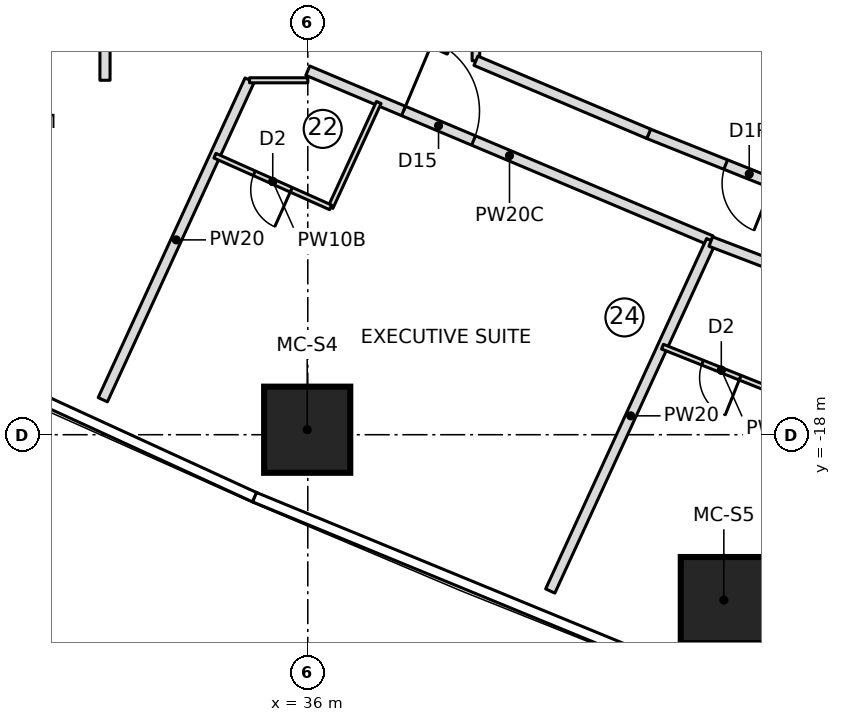
"""IFC4 building model, lengths in metres.
Left out: names, types, materials, properties, quantities, classifications, styles, units other than length and angle.
Written with IfcOpenShell. Run it as: python <this file> out.ifc"""

import sys

from ifc_helpers import new_model, si_unit, direction, frame, frame_2d, origin, origin_2d, place, context, subcontext, project, spatial, rectangle, extrude, element, fill, save


model = new_model("IFC4")
c1 = context("Model", 3, precision=1e-05, world=origin(), true_north=direction((0.0, 1.0)))
c2 = subcontext(c1, "Body", "Model", "MODEL_VIEW")
j1 = project(units=[si_unit("LENGTHUNIT", "METRE"), si_unit("PLANEANGLEUNIT", "RADIAN")], contexts=[c1])
p1 = place(None, origin())
s1 = spatial("IfcSite", under=j1, at=p1, CompositionType="ELEMENT")
p2 = place(p1, origin())
s2 = spatial("IfcBuilding", under=s1, at=p2, CompositionType="ELEMENT")
p3 = place(p2, frame((0.0, 0.0, 92.0)))
s3 = spatial("IfcBuildingStorey", under=s2, at=p3, CompositionType="ELEMENT", Elevation=92.0)
for number, where, z_axis, x_axis in (
    (1, (35.988, -17.902, 0.0), (0.0, 0.0, 1.0), (1.0, 0.0, 0.0)),
    (2, (44.211, -21.264, 0.0), (0.0, 0.0, 1.0), (1.0, 0.0, 0.0)),
):
    element("IfcColumn", number, at=place(p3, frame(where, z_axis=z_axis, x_axis=x_axis)), inside=s3, PredefinedType="COLUMN", context=c2, shape_type="SweptSolid", body=[
        extrude(rectangle(XDim=1.7, YDim=1.7, at=origin_2d()), origin(), (0.0, 0.0, 1.0), 3.55),
    ])
p4 = place(p3, frame((31.955, -17.309, 0.0), z_axis=(0.0, 0.0, 1.0), x_axis=(0.417418561443, 0.908714336061, 0.0)))
e3 = element("IfcWall", 3, at=p4, inside=s3, PredefinedType="PARTITIONING", context=c2, shape_type="SweptSolid", body=[
    extrude(rectangle(XDim=6.943, YDim=0.2, at=frame_2d((3.472, 0.0))), origin(), (0.0, 0.0, 1.0), 3.25),
])
p5 = place(p3, frame((36.0, -10.815, 0.0), z_axis=(0.0, 0.0, 1.0), x_axis=(0.921519373184, -0.388332389644, 0.0)))
e4 = element("IfcWall", 4, at=p5, inside=s3, PredefinedType="PARTITIONING", context=c2, shape_type="SweptSolid", body=[
    extrude(rectangle(XDim=8.639, YDim=0.2, at=frame_2d((4.32, 0.0))), origin(), (0.0, 0.0, 1.0), 3.25),
])
p6 = place(p5, frame((2.05, 0.0, 0.0)))
e5 = element("IfcOpeningElement", 5, at=p6, cuts=e4, PredefinedType="OPENING", context=c2, shape_type="SweptSolid", body=[
    extrude(rectangle(XDim=1.5, YDim=2.1, at=frame_2d((0.75, 1.05))), frame((0.0, 0.11, 0.0), z_axis=(0.0, -1.0, 0.0), x_axis=(1.0, 0.0, 0.0)), (0.0, 0.0, 1.0), 0.22),
])
p7 = place(p3, frame((37.4, -11.443, 0.0), z_axis=(0.0, 0.0, 1.0), x_axis=(-0.417466676952, -0.908692232626, 0.0)))
e6 = element("IfcWall", 6, at=p7, inside=s3, PredefinedType="PARTITIONING", context=c2, shape_type="SweptSolid", body=[
    extrude(rectangle(XDim=2.277, YDim=0.1, at=frame_2d((1.139, 0.0))), origin(), (0.0, 0.0, 1.0), 3.25),
])
p8 = place(p3, frame((36.45, -13.513, 0.0), z_axis=(0.0, 0.0, 1.0), x_axis=(-0.913016449487, 0.407922741417, 0.0)))
e7 = element("IfcWall", 7, at=p8, inside=s3, PredefinedType="PARTITIONING", context=c2, shape_type="SweptSolid", body=[
    extrude(rectangle(XDim=2.5, YDim=0.1, at=frame_2d((1.25, 0.0))), origin(), (0.0, 0.0, 1.0), 3.25),
])
p9 = place(p8, frame((0.85, 0.0, 0.0)))
e8 = element("IfcOpeningElement", 8, at=p9, cuts=e7, PredefinedType="OPENING", context=c2, shape_type="SweptSolid", body=[
    extrude(rectangle(XDim=0.8, YDim=2.1, at=frame_2d((0.4, 1.05))), frame((0.0, 0.06, 0.0), z_axis=(0.0, -1.0, 0.0), x_axis=(1.0, 0.0, 0.0)), (0.0, 0.0, 1.0), 0.12),
])
p10 = place(p3, frame((40.785, -21.085, 0.0), z_axis=(0.0, 0.0, 1.0), x_axis=(0.417427858403, 0.908710065438, 0.0)))
e9 = element("IfcWall", 9, at=p10, inside=s3, PredefinedType="PARTITIONING", context=c2, shape_type="SweptSolid", body=[
    extrude(rectangle(XDim=7.61, YDim=0.2, at=frame_2d((3.805, 0.0))), origin(), (0.0, 0.0, 1.0), 3.25),
])
p11 = place(p3, frame((45.321, -17.19, 0.0), z_axis=(0.0, 0.0, 1.0), x_axis=(-0.928618072339, 0.371037027431, 0.0)))
e10 = element("IfcWall", 10, at=p11, inside=s3, PredefinedType="PARTITIONING", context=c2, shape_type="SweptSolid", body=[
    extrude(rectangle(XDim=2.5, YDim=0.1, at=frame_2d((1.25, 0.0))), origin(), (0.0, 0.0, 1.0), 3.25),
])
p12 = place(p11, frame((0.85, 0.0, 0.0)))
e11 = element("IfcOpeningElement", 11, at=p12, cuts=e10, PredefinedType="OPENING", context=c2, shape_type="SweptSolid", body=[
    extrude(rectangle(XDim=0.8, YDim=2.1, at=frame_2d((0.4, 1.05))), frame((0.0, 0.06, 0.0), z_axis=(0.0, -1.0, 0.0), x_axis=(1.0, 0.0, 0.0)), (0.0, 0.0, 1.0), 0.12),
])
p13 = place(p3, frame((38.792, -10.397, 0.0), z_axis=(0.0, 0.0, 1.0), x_axis=(-0.913029587861, 0.407893333716, 0.0)))
e12 = element("IfcWall", 12, at=p13, inside=s3, PredefinedType="PARTITIONING", context=c2, shape_type="SweptSolid", body=[
    extrude(rectangle(XDim=3.058, YDim=0.2, at=frame_2d((1.529, 0.0))), origin(), (0.0, 0.0, 1.0), 3.25),
])
p14 = place(p3, frame((39.318, -10.619, 0.0), z_axis=(0.0, 0.0, 1.0), x_axis=(0.0, 1.0, 0.0)))
e13 = element("IfcWall", 13, at=p14, inside=s3, PredefinedType="PARTITIONING", context=c2, shape_type="SweptSolid", body=[
    extrude(rectangle(XDim=21.239, YDim=0.15, at=frame_2d((10.619, 0.0))), origin(), (0.0, 0.0, 1.0), 3.25),
])
p15 = place(p3, frame((46.696, -13.647, 0.0), z_axis=(0.0, 0.0, 1.0), x_axis=(-0.928638161177, 0.370986745864, 0.0)))
e14 = element("IfcWall", 14, at=p15, inside=s3, PredefinedType="PARTITIONING", context=c2, shape_type="SweptSolid", body=[
    extrude(rectangle(XDim=4.273, YDim=0.2, at=frame_2d((2.136, 0.0))), origin(), (0.0, 0.0, 1.0), 3.25),
])
p16 = place(p15, frame((1.636, 0.0, 0.0)))
e15 = element("IfcOpeningElement", 15, at=p16, cuts=e14, PredefinedType="OPENING", context=c2, shape_type="SweptSolid", body=[
    extrude(rectangle(XDim=1.0, YDim=2.1, at=frame_2d((0.5, 1.05))), frame((0.0, 0.11, 0.0), z_axis=(0.0, -1.0, 0.0), x_axis=(1.0, 0.0, 0.0)), (0.0, 0.0, 1.0), 0.22),
])
p17 = place(p3, frame((42.728, -12.062, 0.0), z_axis=(0.0, 0.0, 1.0), x_axis=(-0.92101730011, 0.389521671923, 0.0)))
e16 = element("IfcWall", 16, at=p17, inside=s3, PredefinedType="PARTITIONING", context=c2, shape_type="SweptSolid", body=[
    extrude(rectangle(XDim=3.702, YDim=0.2, at=frame_2d((1.851, 0.0))), origin(), (0.0, 0.0, 1.0), 3.25),
])
p18 = place(p3, frame((34.851, -11.005, 0.0), z_axis=(0.0, 0.0, 1.0), x_axis=(1.0, 0.0, 0.0)))
e17 = element("IfcWall", 17, at=p18, inside=s3, PredefinedType="PARTITIONING", context=c2, shape_type="SweptSolid", body=[
    extrude(rectangle(XDim=1.15, YDim=0.1, at=frame_2d((0.575, 0.0))), origin(), (0.0, 0.0, 1.0), 3.25),
])
p19 = place(p3, frame((43.953, -14.188, 0.0), z_axis=(0.0, 0.0, 1.0), x_axis=(0.934288494055, -0.356517895592, 0.0)))
e18 = element("IfcWall", 18, at=p19, inside=s3, PredefinedType="PARTITIONING", context=c2, shape_type="SweptSolid", body=[
    extrude(rectangle(XDim=4.177, YDim=0.2, at=frame_2d((2.088, 0.0))), origin(), (0.0, 0.0, 1.0), 3.25),
])
p20 = place(p19, frame((3.05, 0.0, 0.0)))
e19 = element("IfcOpeningElement", 19, at=p20, cuts=e18, PredefinedType="OPENING", context=c2, shape_type="SweptSolid", body=[
    extrude(rectangle(XDim=1.0, YDim=2.1, at=frame_2d((0.5, 1.05))), frame((0.0, 0.11, 0.0), z_axis=(0.0, -1.0, 0.0), x_axis=(1.0, 0.0, 0.0)), (0.0, 0.0, 1.0), 0.22),
])
p21 = place(p3, frame((32.0, -8.951, 0.0), z_axis=(0.0, 0.0, 1.0), x_axis=(-0.001188918432, -0.999999293236, 0.0)))
e20 = element("IfcWall", 20, at=p21, inside=s3, PredefinedType="PARTITIONING", context=c2, shape_type="SweptSolid", body=[
    extrude(rectangle(XDim=2.053, YDim=0.2, at=frame_2d((1.027, 0.0))), origin(), (0.0, 0.0, 1.0), 3.25),
])
p22 = place(p9, origin())
e21 = element("IfcDoor", 21, at=p22, inside=s3, OperationType="SINGLE_SWING_LEFT", PredefinedType="DOOR", context=c2, shape_type="SweptSolid", body=[
    extrude(rectangle(XDim=0.8, YDim=2.1, at=frame_2d((0.4, 1.05))), frame((0.0, 0.025, 0.0), z_axis=(0.0, -1.0, 0.0), x_axis=(1.0, 0.0, 0.0)), (0.0, 0.0, 1.0), 0.05),
])
fill(e8, e21)
p23 = place(p6, origin())
e22 = element("IfcDoor", 22, at=p23, inside=s3, OperationType="DOUBLE_DOOR_SINGLE_SWING", PredefinedType="DOOR", context=c2, shape_type="SweptSolid", body=[
    extrude(rectangle(XDim=1.5, YDim=2.1, at=frame_2d((0.75, 1.05))), frame((0.0, 0.025, 0.0), z_axis=(0.0, -1.0, 0.0), x_axis=(1.0, 0.0, 0.0)), (0.0, 0.0, 1.0), 0.05),
])
fill(e5, e22)
p24 = place(p12, origin())
e23 = element("IfcDoor", 23, at=p24, inside=s3, OperationType="SINGLE_SWING_LEFT", PredefinedType="DOOR", context=c2, shape_type="SweptSolid", body=[
    extrude(rectangle(XDim=0.8, YDim=2.1, at=frame_2d((0.4, 1.05))), frame((0.0, 0.025, 0.0), z_axis=(0.0, -1.0, 0.0), x_axis=(1.0, 0.0, 0.0)), (0.0, 0.0, 1.0), 0.05),
])
fill(e11, e23)
p25 = place(p16, origin())
e24 = element("IfcDoor", 24, at=p25, inside=s3, OperationType="SINGLE_SWING_RIGHT", PredefinedType="DOOR", context=c2, shape_type="SweptSolid", body=[
    extrude(rectangle(XDim=1.0, YDim=2.1, at=frame_2d((0.5, 1.05))), frame((0.0, 0.025, 0.0), z_axis=(0.0, -1.0, 0.0), x_axis=(1.0, 0.0, 0.0)), (0.0, 0.0, 1.0), 0.05),
])
fill(e15, e24)
save(model, sys.argv[1])
